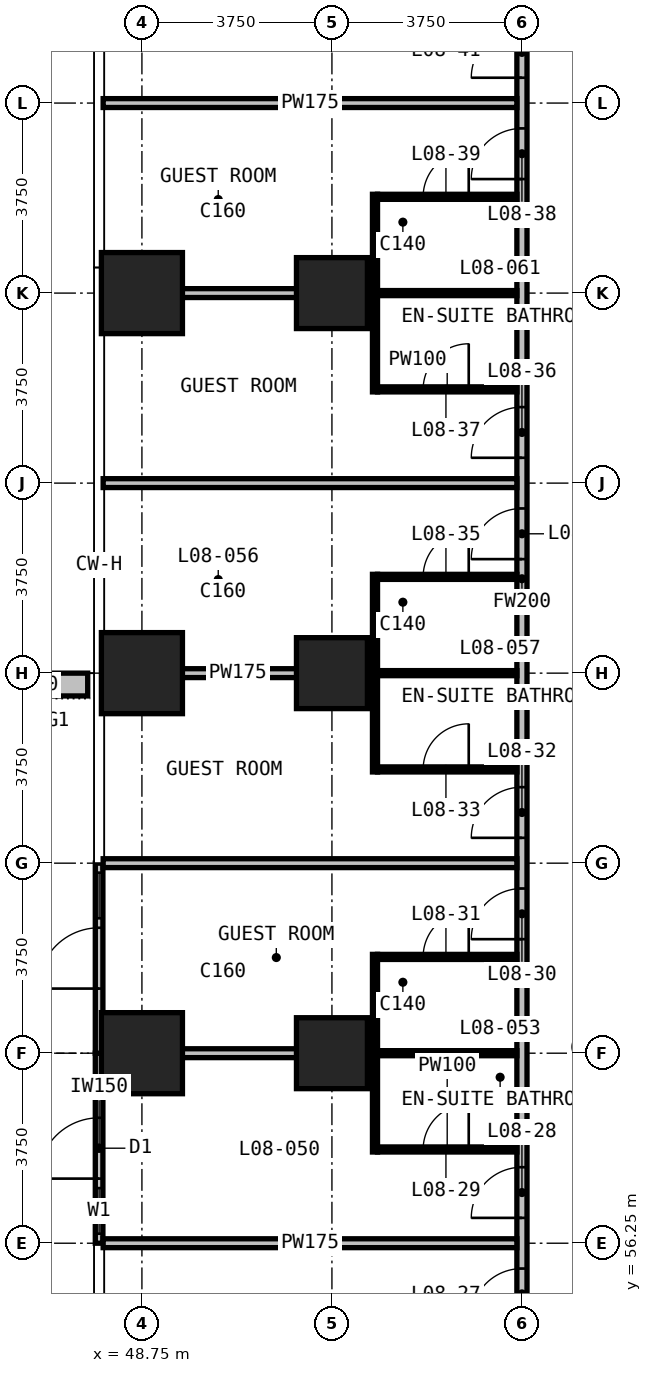
"""IFC4 building model, lengths in metres.
Left out: names, types, materials, properties, quantities, classifications, styles, units other than length and angle.
Written with IfcOpenShell. Run it as: python <this file> out.ifc"""

import sys

from ifc_helpers import new_model, si_unit, direction, frame, frame_2d, origin, origin_2d, place, context, subcontext, project, spatial, rectangle, extrude, element, fill, save


model = new_model("IFC4")
c1 = context("Model", 3, precision=1e-05, world=origin(), true_north=direction((0.0, 1.0)))
c2 = subcontext(c1, "Body", "Model", "MODEL_VIEW")
j1 = project(units=[si_unit("LENGTHUNIT", "METRE"), si_unit("PLANEANGLEUNIT", "RADIAN")], contexts=[c1])
p1 = place(None, origin())
s1 = spatial("IfcSite", under=j1, at=p1, CompositionType="ELEMENT")
p2 = place(p1, origin())
s2 = spatial("IfcBuilding", under=s1, at=p2, CompositionType="ELEMENT")
p3 = place(p2, frame((0.0, 0.0, 46.1)))
s3 = spatial("IfcBuildingStorey", under=s2, at=p3, CompositionType="ELEMENT", Elevation=46.1)
for number, where, z_axis, x_axis in (
    (1, (48.75, 60.0, 0.0), (0.0, 0.0, 1.0), (1.0, 0.0, 0.0)),
    (2, (48.75, 67.5, 0.0), (0.0, 0.0, 1.0), (1.0, 0.0, 0.0)),
    (3, (48.75, 75.0, 0.0), (0.0, 0.0, 1.0), (1.0, 0.0, 0.0)),
):
    element("IfcColumn", number, at=place(p3, frame(where, z_axis=z_axis, x_axis=x_axis)), inside=s3, PredefinedType="COLUMN", context=c2, shape_type="SweptSolid", body=[
        extrude(rectangle(XDim=1.6, YDim=1.6, at=origin_2d()), origin(), (0.0, 0.0, 1.0), 3.3),
    ])
for number, where, z_axis, x_axis in (
    (4, (52.5, 60.0, 0.0), (0.0, 0.0, 1.0), (1.0, 0.0, 0.0)),
    (5, (52.5, 67.5, 0.0), (0.0, 0.0, 1.0), (1.0, 0.0, 0.0)),
    (6, (52.5, 75.0, 0.0), (0.0, 0.0, 1.0), (1.0, 0.0, 0.0)),
):
    element("IfcColumn", number, at=place(p3, frame(where, z_axis=z_axis, x_axis=x_axis)), inside=s3, PredefinedType="COLUMN", context=c2, shape_type="SweptSolid", body=[
        extrude(rectangle(XDim=1.4, YDim=1.4, at=origin_2d()), origin(), (0.0, 0.0, 1.0), 3.3),
    ])
p4 = place(p3, frame((47.905, 56.25, 0.0), z_axis=(0.0, 0.0, 1.0), x_axis=(0.0, 1.0, 0.0)))
e7 = element("IfcWall", 7, at=p4, inside=s3, PredefinedType="SOLIDWALL", context=c2, shape_type="SweptSolid", body=[
    extrude(rectangle(XDim=3.75, YDim=0.15, at=frame_2d((1.875, 0.0))), origin(), (0.0, 0.0, 1.0), 3.0),
])
p5 = place(p4, frame((0.188, 0.0, 0.1)))
e8 = element("IfcOpeningElement", 8, at=p5, cuts=e7, PredefinedType="OPENING", context=c2, shape_type="SweptSolid", body=[
    extrude(rectangle(XDim=0.9, YDim=2.4, at=frame_2d((0.45, 1.2))), frame((0.0, 0.085, 0.0), z_axis=(0.0, -1.0, 0.0), x_axis=(1.0, 0.0, 0.0)), (0.0, 0.0, 1.0), 0.17),
])
p6 = place(p4, frame((1.275, 0.0, 0.0)))
e9 = element("IfcOpeningElement", 9, at=p6, cuts=e7, PredefinedType="OPENING", context=c2, shape_type="SweptSolid", body=[
    extrude(rectangle(XDim=1.2, YDim=2.4, at=frame_2d((0.6, 1.2))), frame((0.0, 0.085, 0.0), z_axis=(0.0, -1.0, 0.0), x_axis=(1.0, 0.0, 0.0)), (0.0, 0.0, 1.0), 0.17),
])
p7 = place(p3, frame((47.905, 60.0, 0.0), z_axis=(0.0, 0.0, 1.0), x_axis=(0.0, 1.0, 0.0)))
e10 = element("IfcWall", 10, at=p7, inside=s3, PredefinedType="SOLIDWALL", context=c2, shape_type="SweptSolid", body=[
    extrude(rectangle(XDim=3.75, YDim=0.15, at=frame_2d((1.875, 0.0))), origin(), (0.0, 0.0, 1.0), 3.0),
])
p8 = place(p7, frame((1.275, 0.0, 0.0)))
e11 = element("IfcOpeningElement", 11, at=p8, cuts=e10, PredefinedType="OPENING", context=c2, shape_type="SweptSolid", body=[
    extrude(rectangle(XDim=1.2, YDim=2.4, at=frame_2d((0.6, 1.2))), frame((0.0, 0.085, 0.0), z_axis=(0.0, -1.0, 0.0), x_axis=(1.0, 0.0, 0.0)), (0.0, 0.0, 1.0), 0.17),
])
p9 = place(p7, frame((2.663, 0.0, 0.1)))
e12 = element("IfcOpeningElement", 12, at=p9, cuts=e10, PredefinedType="OPENING", context=c2, shape_type="SweptSolid", body=[
    extrude(rectangle(XDim=0.9, YDim=2.4, at=frame_2d((0.45, 1.2))), frame((0.0, 0.085, 0.0), z_axis=(0.0, -1.0, 0.0), x_axis=(1.0, 0.0, 0.0)), (0.0, 0.0, 1.0), 0.17),
])
p10 = place(p3, frame((47.68, 67.275, 0.0), z_axis=(0.0, 0.0, 1.0), x_axis=(-1.0, 0.0, 0.0)))
e13 = element("IfcWall", 13, at=p10, inside=s3, PredefinedType="USERDEFINED", context=c2, shape_type="SweptSolid", body=[
    extrude(rectangle(XDim=2.33, YDim=0.45, at=frame_2d((1.165, 0.0))), origin(), (0.0, 0.0, 1.0), 1.1),
])
p11 = place(p3, frame((56.25, 52.4, 0.0), z_axis=(0.0, 0.0, 1.0), x_axis=(0.0, 1.0, 0.0)))
e14 = element("IfcWall", 14, at=p11, inside=s3, PredefinedType="PARTITIONING", context=c2, shape_type="SweptSolid", body=[
    extrude(rectangle(XDim=33.925, YDim=0.2, at=frame_2d((16.962, 0.0))), origin(), (0.0, 0.0, 1.0), 3.0),
])
p12 = place(p11, frame((2.35, 0.0, 0.0)))
e15 = element("IfcOpeningElement", 15, at=p12, cuts=e14, PredefinedType="OPENING", context=c2, shape_type="SweptSolid", body=[
    extrude(rectangle(XDim=1.0, YDim=2.2, at=frame_2d((0.5, 1.1))), frame((0.0, 0.11, 0.0), z_axis=(0.0, -1.0, 0.0), x_axis=(1.0, 0.0, 0.0)), (0.0, 0.0, 1.0), 0.22),
])
p13 = place(p11, frame((4.35, 0.0, 0.0)))
e16 = element("IfcOpeningElement", 16, at=p13, cuts=e14, PredefinedType="OPENING", context=c2, shape_type="SweptSolid", body=[
    extrude(rectangle(XDim=1.0, YDim=2.2, at=frame_2d((0.5, 1.1))), frame((0.0, 0.11, 0.0), z_axis=(0.0, -1.0, 0.0), x_axis=(1.0, 0.0, 0.0)), (0.0, 0.0, 1.0), 0.22),
])
p14 = place(p11, frame((9.85, 0.0, 0.0)))
e17 = element("IfcOpeningElement", 17, at=p14, cuts=e14, PredefinedType="OPENING", context=c2, shape_type="SweptSolid", body=[
    extrude(rectangle(XDim=1.0, YDim=2.2, at=frame_2d((0.5, 1.1))), frame((0.0, 0.11, 0.0), z_axis=(0.0, -1.0, 0.0), x_axis=(1.0, 0.0, 0.0)), (0.0, 0.0, 1.0), 0.22),
])
p15 = place(p11, frame((11.85, 0.0, 0.0)))
e18 = element("IfcOpeningElement", 18, at=p15, cuts=e14, PredefinedType="OPENING", context=c2, shape_type="SweptSolid", body=[
    extrude(rectangle(XDim=1.0, YDim=2.2, at=frame_2d((0.5, 1.1))), frame((0.0, 0.11, 0.0), z_axis=(0.0, -1.0, 0.0), x_axis=(1.0, 0.0, 0.0)), (0.0, 0.0, 1.0), 0.22),
])
p16 = place(p11, frame((17.35, 0.0, 0.0)))
e19 = element("IfcOpeningElement", 19, at=p16, cuts=e14, PredefinedType="OPENING", context=c2, shape_type="SweptSolid", body=[
    extrude(rectangle(XDim=1.0, YDim=2.2, at=frame_2d((0.5, 1.1))), frame((0.0, 0.11, 0.0), z_axis=(0.0, -1.0, 0.0), x_axis=(1.0, 0.0, 0.0)), (0.0, 0.0, 1.0), 0.22),
])
p17 = place(p11, frame((19.35, 0.0, 0.0)))
e20 = element("IfcOpeningElement", 20, at=p17, cuts=e14, PredefinedType="OPENING", context=c2, shape_type="SweptSolid", body=[
    extrude(rectangle(XDim=1.0, YDim=2.2, at=frame_2d((0.5, 1.1))), frame((0.0, 0.11, 0.0), z_axis=(0.0, -1.0, 0.0), x_axis=(1.0, 0.0, 0.0)), (0.0, 0.0, 1.0), 0.22),
])
p18 = place(p11, frame((24.85, 0.0, 0.0)))
e21 = element("IfcOpeningElement", 21, at=p18, cuts=e14, PredefinedType="OPENING", context=c2, shape_type="SweptSolid", body=[
    extrude(rectangle(XDim=1.0, YDim=2.2, at=frame_2d((0.5, 1.1))), frame((0.0, 0.11, 0.0), z_axis=(0.0, -1.0, 0.0), x_axis=(1.0, 0.0, 0.0)), (0.0, 0.0, 1.0), 0.22),
])
p19 = place(p11, frame((26.85, 0.0, 0.0)))
e22 = element("IfcOpeningElement", 22, at=p19, cuts=e14, PredefinedType="OPENING", context=c2, shape_type="SweptSolid", body=[
    extrude(rectangle(XDim=1.0, YDim=2.2, at=frame_2d((0.5, 1.1))), frame((0.0, 0.11, 0.0), z_axis=(0.0, -1.0, 0.0), x_axis=(1.0, 0.0, 0.0)), (0.0, 0.0, 1.0), 0.22),
])
p20 = place(p11, frame((31.55, 0.0, 0.0)))
e23 = element("IfcOpeningElement", 23, at=p20, cuts=e14, PredefinedType="OPENING", context=c2, shape_type="SweptSolid", body=[
    extrude(rectangle(XDim=0.9, YDim=2.2, at=frame_2d((0.45, 1.1))), frame((0.0, 0.11, 0.0), z_axis=(0.0, -1.0, 0.0), x_axis=(1.0, 0.0, 0.0)), (0.0, 0.0, 1.0), 0.22),
])
p21 = place(p3, frame((47.985, 56.25, 0.0), z_axis=(0.0, 0.0, 1.0), x_axis=(1.0, 0.0, 0.0)))
e24 = element("IfcWall", 24, at=p21, inside=s3, PredefinedType="PARTITIONING", context=c2, shape_type="SweptSolid", body=[
    extrude(rectangle(XDim=8.165, YDim=0.175, at=frame_2d((4.083, 0.0))), origin(), (0.0, 0.0, 1.0), 3.0),
])
p22 = place(p3, frame((47.985, 60.0, 0.0), z_axis=(0.0, 0.0, 1.0), x_axis=(1.0, 0.0, 0.0)))
e25 = element("IfcWall", 25, at=p22, inside=s3, PredefinedType="PARTITIONING", context=c2, shape_type="SweptSolid", body=[
    extrude(rectangle(XDim=5.315, YDim=0.175, at=frame_2d((2.657, 0.0))), origin(), (0.0, 0.0, 1.0), 3.0),
])
p23 = place(p3, frame((47.985, 63.75, 0.0), z_axis=(0.0, 0.0, 1.0), x_axis=(1.0, 0.0, 0.0)))
e26 = element("IfcWall", 26, at=p23, inside=s3, PredefinedType="PARTITIONING", context=c2, shape_type="SweptSolid", body=[
    extrude(rectangle(XDim=8.165, YDim=0.175, at=frame_2d((4.083, 0.0))), origin(), (0.0, 0.0, 1.0), 3.0),
])
p24 = place(p3, frame((47.985, 67.5, 0.0), z_axis=(0.0, 0.0, 1.0), x_axis=(1.0, 0.0, 0.0)))
e27 = element("IfcWall", 27, at=p24, inside=s3, PredefinedType="PARTITIONING", context=c2, shape_type="SweptSolid", body=[
    extrude(rectangle(XDim=5.315, YDim=0.175, at=frame_2d((2.657, 0.0))), origin(), (0.0, 0.0, 1.0), 3.0),
])
p25 = place(p3, frame((47.985, 71.25, 0.0), z_axis=(0.0, 0.0, 1.0), x_axis=(1.0, 0.0, 0.0)))
e28 = element("IfcWall", 28, at=p25, inside=s3, PredefinedType="PARTITIONING", context=c2, shape_type="SweptSolid", body=[
    extrude(rectangle(XDim=8.165, YDim=0.175, at=frame_2d((4.083, 0.0))), origin(), (0.0, 0.0, 1.0), 3.0),
])
p26 = place(p3, frame((47.985, 75.0, 0.0), z_axis=(0.0, 0.0, 1.0), x_axis=(1.0, 0.0, 0.0)))
e29 = element("IfcWall", 29, at=p26, inside=s3, PredefinedType="PARTITIONING", context=c2, shape_type="SweptSolid", body=[
    extrude(rectangle(XDim=5.315, YDim=0.175, at=frame_2d((2.657, 0.0))), origin(), (0.0, 0.0, 1.0), 3.0),
])
p27 = place(p3, frame((47.985, 78.75, 0.0), z_axis=(0.0, 0.0, 1.0), x_axis=(1.0, 0.0, 0.0)))
e30 = element("IfcWall", 30, at=p27, inside=s3, PredefinedType="PARTITIONING", context=c2, shape_type="SweptSolid", body=[
    extrude(rectangle(XDim=8.165, YDim=0.175, at=frame_2d((4.083, 0.0))), origin(), (0.0, 0.0, 1.0), 3.0),
])
p28 = place(p3, frame((53.4, 58.1, 0.0), z_axis=(0.0, 0.0, 1.0), x_axis=(1.0, 0.0, 0.0)))
e31 = element("IfcWall", 31, at=p28, inside=s3, PredefinedType="PARTITIONING", context=c2, shape_type="SweptSolid", body=[
    extrude(rectangle(XDim=2.75, YDim=0.1, at=frame_2d((1.375, 0.0))), origin(), (0.0, 0.0, 1.0), 3.0),
])
p29 = place(p28, frame((0.9, 0.0, 0.0)))
e32 = element("IfcOpeningElement", 32, at=p29, cuts=e31, PredefinedType="OPENING", context=c2, shape_type="SweptSolid", body=[
    extrude(rectangle(XDim=0.9, YDim=2.2, at=frame_2d((0.45, 1.1))), frame((0.0, 0.06, 0.0), z_axis=(0.0, -1.0, 0.0), x_axis=(1.0, 0.0, 0.0)), (0.0, 0.0, 1.0), 0.12),
])
p30 = place(p3, frame((53.4, 60.0, 0.0), z_axis=(0.0, 0.0, 1.0), x_axis=(1.0, 0.0, 0.0)))
e33 = element("IfcWall", 33, at=p30, inside=s3, PredefinedType="PARTITIONING", context=c2, shape_type="SweptSolid", body=[
    extrude(rectangle(XDim=2.75, YDim=0.1, at=frame_2d((1.375, 0.0))), origin(), (0.0, 0.0, 1.0), 3.0),
])
p31 = place(p3, frame((53.4, 61.9, 0.0), z_axis=(0.0, 0.0, 1.0), x_axis=(1.0, 0.0, 0.0)))
e34 = element("IfcWall", 34, at=p31, inside=s3, PredefinedType="PARTITIONING", context=c2, shape_type="SweptSolid", body=[
    extrude(rectangle(XDim=2.75, YDim=0.1, at=frame_2d((1.375, 0.0))), origin(), (0.0, 0.0, 1.0), 3.0),
])
p32 = place(p31, frame((0.9, 0.0, 0.0)))
e35 = element("IfcOpeningElement", 35, at=p32, cuts=e34, PredefinedType="OPENING", context=c2, shape_type="SweptSolid", body=[
    extrude(rectangle(XDim=0.9, YDim=2.2, at=frame_2d((0.45, 1.1))), frame((0.0, 0.06, 0.0), z_axis=(0.0, -1.0, 0.0), x_axis=(1.0, 0.0, 0.0)), (0.0, 0.0, 1.0), 0.12),
])
p33 = place(p3, frame((53.4, 65.6, 0.0), z_axis=(0.0, 0.0, 1.0), x_axis=(1.0, 0.0, 0.0)))
e36 = element("IfcWall", 36, at=p33, inside=s3, PredefinedType="PARTITIONING", context=c2, shape_type="SweptSolid", body=[
    extrude(rectangle(XDim=2.75, YDim=0.1, at=frame_2d((1.375, 0.0))), origin(), (0.0, 0.0, 1.0), 3.0),
])
p34 = place(p33, frame((0.9, 0.0, 0.0)))
e37 = element("IfcOpeningElement", 37, at=p34, cuts=e36, PredefinedType="OPENING", context=c2, shape_type="SweptSolid", body=[
    extrude(rectangle(XDim=0.9, YDim=2.2, at=frame_2d((0.45, 1.1))), frame((0.0, 0.06, 0.0), z_axis=(0.0, -1.0, 0.0), x_axis=(1.0, 0.0, 0.0)), (0.0, 0.0, 1.0), 0.12),
])
p35 = place(p3, frame((53.4, 67.5, 0.0), z_axis=(0.0, 0.0, 1.0), x_axis=(1.0, 0.0, 0.0)))
e38 = element("IfcWall", 38, at=p35, inside=s3, PredefinedType="PARTITIONING", context=c2, shape_type="SweptSolid", body=[
    extrude(rectangle(XDim=2.75, YDim=0.1, at=frame_2d((1.375, 0.0))), origin(), (0.0, 0.0, 1.0), 3.0),
])
p36 = place(p3, frame((53.4, 69.4, 0.0), z_axis=(0.0, 0.0, 1.0), x_axis=(1.0, 0.0, 0.0)))
e39 = element("IfcWall", 39, at=p36, inside=s3, PredefinedType="PARTITIONING", context=c2, shape_type="SweptSolid", body=[
    extrude(rectangle(XDim=2.75, YDim=0.1, at=frame_2d((1.375, 0.0))), origin(), (0.0, 0.0, 1.0), 3.0),
])
p37 = place(p36, frame((0.9, 0.0, 0.0)))
e40 = element("IfcOpeningElement", 40, at=p37, cuts=e39, PredefinedType="OPENING", context=c2, shape_type="SweptSolid", body=[
    extrude(rectangle(XDim=0.9, YDim=2.2, at=frame_2d((0.45, 1.1))), frame((0.0, 0.06, 0.0), z_axis=(0.0, -1.0, 0.0), x_axis=(1.0, 0.0, 0.0)), (0.0, 0.0, 1.0), 0.12),
])
p38 = place(p3, frame((53.4, 73.1, 0.0), z_axis=(0.0, 0.0, 1.0), x_axis=(1.0, 0.0, 0.0)))
e41 = element("IfcWall", 41, at=p38, inside=s3, PredefinedType="PARTITIONING", context=c2, shape_type="SweptSolid", body=[
    extrude(rectangle(XDim=2.75, YDim=0.1, at=frame_2d((1.375, 0.0))), origin(), (0.0, 0.0, 1.0), 3.0),
])
p39 = place(p38, frame((0.9, 0.0, 0.0)))
e42 = element("IfcOpeningElement", 42, at=p39, cuts=e41, PredefinedType="OPENING", context=c2, shape_type="SweptSolid", body=[
    extrude(rectangle(XDim=0.9, YDim=2.2, at=frame_2d((0.45, 1.1))), frame((0.0, 0.06, 0.0), z_axis=(0.0, -1.0, 0.0), x_axis=(1.0, 0.0, 0.0)), (0.0, 0.0, 1.0), 0.12),
])
p40 = place(p3, frame((53.4, 75.0, 0.0), z_axis=(0.0, 0.0, 1.0), x_axis=(1.0, 0.0, 0.0)))
e43 = element("IfcWall", 43, at=p40, inside=s3, PredefinedType="PARTITIONING", context=c2, shape_type="SweptSolid", body=[
    extrude(rectangle(XDim=2.75, YDim=0.1, at=frame_2d((1.375, 0.0))), origin(), (0.0, 0.0, 1.0), 3.0),
])
p41 = place(p3, frame((53.4, 76.9, 0.0), z_axis=(0.0, 0.0, 1.0), x_axis=(1.0, 0.0, 0.0)))
e44 = element("IfcWall", 44, at=p41, inside=s3, PredefinedType="PARTITIONING", context=c2, shape_type="SweptSolid", body=[
    extrude(rectangle(XDim=2.75, YDim=0.1, at=frame_2d((1.375, 0.0))), origin(), (0.0, 0.0, 1.0), 3.0),
])
p42 = place(p41, frame((0.9, 0.0, 0.0)))
e45 = element("IfcOpeningElement", 45, at=p42, cuts=e44, PredefinedType="OPENING", context=c2, shape_type="SweptSolid", body=[
    extrude(rectangle(XDim=0.9, YDim=2.2, at=frame_2d((0.45, 1.1))), frame((0.0, 0.06, 0.0), z_axis=(0.0, -1.0, 0.0), x_axis=(1.0, 0.0, 0.0)), (0.0, 0.0, 1.0), 0.12),
])
for number, where, z_axis, x_axis in (
    (46, (53.35, 58.05, 0.0), (0.0, 0.0, 1.0), (0.0, 1.0, 0.0)),
    (47, (53.35, 65.55, 0.0), (0.0, 0.0, 1.0), (0.0, 1.0, 0.0)),
    (48, (53.35, 73.05, 0.0), (0.0, 0.0, 1.0), (0.0, 1.0, 0.0)),
):
    element("IfcWall", number, at=place(p3, frame(where, z_axis=z_axis, x_axis=x_axis)), inside=s3, PredefinedType="PARTITIONING", context=c2, shape_type="SweptSolid", body=[
        extrude(rectangle(XDim=3.9, YDim=0.1, at=frame_2d((1.95, 0.0))), origin(), (0.0, 0.0, 1.0), 3.0),
    ])
p43 = place(p5, origin())
e49 = element("IfcWindow", 49, at=p43, inside=s3, PartitioningType="SINGLE_PANEL", PredefinedType="WINDOW", context=c2, shape_type="SweptSolid", body=[
    extrude(rectangle(XDim=0.9, YDim=2.4, at=frame_2d((0.45, 1.2))), frame((0.0, 0.03, 0.0), z_axis=(0.0, -1.0, 0.0), x_axis=(1.0, 0.0, 0.0)), (0.0, 0.0, 1.0), 0.06),
])
fill(e8, e49)
p44 = place(p6, origin())
e50 = element("IfcDoor", 50, at=p44, inside=s3, OperationType="SINGLE_SWING_LEFT", PredefinedType="DOOR", context=c2, shape_type="SweptSolid", body=[
    extrude(rectangle(XDim=1.2, YDim=2.4, at=frame_2d((0.6, 1.2))), frame((0.0, 0.025, 0.0), z_axis=(0.0, -1.0, 0.0), x_axis=(1.0, 0.0, 0.0)), (0.0, 0.0, 1.0), 0.05),
])
fill(e9, e50)
p45 = place(p8, origin())
e51 = element("IfcDoor", 51, at=p45, inside=s3, OperationType="SINGLE_SWING_LEFT", PredefinedType="DOOR", context=c2, shape_type="SweptSolid", body=[
    extrude(rectangle(XDim=1.2, YDim=2.4, at=frame_2d((0.6, 1.2))), frame((0.0, 0.025, 0.0), z_axis=(0.0, -1.0, 0.0), x_axis=(1.0, 0.0, 0.0)), (0.0, 0.0, 1.0), 0.05),
])
fill(e11, e51)
p46 = place(p9, origin())
e52 = element("IfcWindow", 52, at=p46, inside=s3, PartitioningType="SINGLE_PANEL", PredefinedType="WINDOW", context=c2, shape_type="SweptSolid", body=[
    extrude(rectangle(XDim=0.9, YDim=2.4, at=frame_2d((0.45, 1.2))), frame((0.0, 0.03, 0.0), z_axis=(0.0, -1.0, 0.0), x_axis=(1.0, 0.0, 0.0)), (0.0, 0.0, 1.0), 0.06),
])
fill(e12, e52)
p47 = place(p12, origin())
e53 = element("IfcDoor", 53, at=p47, inside=s3, OperationType="SINGLE_SWING_LEFT", PredefinedType="DOOR", context=c2, shape_type="SweptSolid", body=[
    extrude(rectangle(XDim=1.0, YDim=2.2, at=frame_2d((0.5, 1.1))), frame((0.0, 0.025, 0.0), z_axis=(0.0, -1.0, 0.0), x_axis=(1.0, 0.0, 0.0)), (0.0, 0.0, 1.0), 0.05),
])
fill(e15, e53)
p48 = place(p13, origin())
e54 = element("IfcDoor", 54, at=p48, inside=s3, OperationType="SINGLE_SWING_LEFT", PredefinedType="DOOR", context=c2, shape_type="SweptSolid", body=[
    extrude(rectangle(XDim=1.0, YDim=2.2, at=frame_2d((0.5, 1.1))), frame((0.0, 0.025, 0.0), z_axis=(0.0, -1.0, 0.0), x_axis=(1.0, 0.0, 0.0)), (0.0, 0.0, 1.0), 0.05),
])
fill(e16, e54)
p49 = place(p29, origin())
e55 = element("IfcDoor", 55, at=p49, inside=s3, OperationType="SINGLE_SWING_RIGHT", PredefinedType="DOOR", context=c2, shape_type="SweptSolid", body=[
    extrude(rectangle(XDim=0.9, YDim=2.2, at=frame_2d((0.45, 1.1))), frame((0.0, 0.025, 0.0), z_axis=(0.0, -1.0, 0.0), x_axis=(1.0, 0.0, 0.0)), (0.0, 0.0, 1.0), 0.05),
])
fill(e32, e55)
p50 = place(p14, origin())
e56 = element("IfcDoor", 56, at=p50, inside=s3, OperationType="SINGLE_SWING_LEFT", PredefinedType="DOOR", context=c2, shape_type="SweptSolid", body=[
    extrude(rectangle(XDim=1.0, YDim=2.2, at=frame_2d((0.5, 1.1))), frame((0.0, 0.025, 0.0), z_axis=(0.0, -1.0, 0.0), x_axis=(1.0, 0.0, 0.0)), (0.0, 0.0, 1.0), 0.05),
])
fill(e17, e56)
p51 = place(p32, origin())
e57 = element("IfcDoor", 57, at=p51, inside=s3, OperationType="SINGLE_SWING_RIGHT", PredefinedType="DOOR", context=c2, shape_type="SweptSolid", body=[
    extrude(rectangle(XDim=0.9, YDim=2.2, at=frame_2d((0.45, 1.1))), frame((0.0, 0.025, 0.0), z_axis=(0.0, -1.0, 0.0), x_axis=(1.0, 0.0, 0.0)), (0.0, 0.0, 1.0), 0.05),
])
fill(e35, e57)
p52 = place(p15, origin())
e58 = element("IfcDoor", 58, at=p52, inside=s3, OperationType="SINGLE_SWING_LEFT", PredefinedType="DOOR", context=c2, shape_type="SweptSolid", body=[
    extrude(rectangle(XDim=1.0, YDim=2.2, at=frame_2d((0.5, 1.1))), frame((0.0, 0.025, 0.0), z_axis=(0.0, -1.0, 0.0), x_axis=(1.0, 0.0, 0.0)), (0.0, 0.0, 1.0), 0.05),
])
fill(e18, e58)
p53 = place(p34, origin())
e59 = element("IfcDoor", 59, at=p53, inside=s3, OperationType="SINGLE_SWING_RIGHT", PredefinedType="DOOR", context=c2, shape_type="SweptSolid", body=[
    extrude(rectangle(XDim=0.9, YDim=2.2, at=frame_2d((0.45, 1.1))), frame((0.0, 0.025, 0.0), z_axis=(0.0, -1.0, 0.0), x_axis=(1.0, 0.0, 0.0)), (0.0, 0.0, 1.0), 0.05),
])
fill(e37, e59)
p54 = place(p16, origin())
e60 = element("IfcDoor", 60, at=p54, inside=s3, OperationType="SINGLE_SWING_RIGHT", PredefinedType="DOOR", context=c2, shape_type="SweptSolid", body=[
    extrude(rectangle(XDim=1.0, YDim=2.2, at=frame_2d((0.5, 1.1))), frame((0.0, 0.025, 0.0), z_axis=(0.0, -1.0, 0.0), x_axis=(1.0, 0.0, 0.0)), (0.0, 0.0, 1.0), 0.05),
])
fill(e19, e60)
p55 = place(p37, origin())
e61 = element("IfcDoor", 61, at=p55, inside=s3, OperationType="SINGLE_SWING_RIGHT", PredefinedType="DOOR", context=c2, shape_type="SweptSolid", body=[
    extrude(rectangle(XDim=0.9, YDim=2.2, at=frame_2d((0.45, 1.1))), frame((0.0, 0.025, 0.0), z_axis=(0.0, -1.0, 0.0), x_axis=(1.0, 0.0, 0.0)), (0.0, 0.0, 1.0), 0.05),
])
fill(e40, e61)
p56 = place(p17, origin())
e62 = element("IfcDoor", 62, at=p56, inside=s3, OperationType="SINGLE_SWING_RIGHT", PredefinedType="DOOR", context=c2, shape_type="SweptSolid", body=[
    extrude(rectangle(XDim=1.0, YDim=2.2, at=frame_2d((0.5, 1.1))), frame((0.0, 0.025, 0.0), z_axis=(0.0, -1.0, 0.0), x_axis=(1.0, 0.0, 0.0)), (0.0, 0.0, 1.0), 0.05),
])
fill(e20, e62)
p57 = place(p39, origin())
e63 = element("IfcDoor", 63, at=p57, inside=s3, OperationType="SINGLE_SWING_RIGHT", PredefinedType="DOOR", context=c2, shape_type="SweptSolid", body=[
    extrude(rectangle(XDim=0.9, YDim=2.2, at=frame_2d((0.45, 1.1))), frame((0.0, 0.025, 0.0), z_axis=(0.0, -1.0, 0.0), x_axis=(1.0, 0.0, 0.0)), (0.0, 0.0, 1.0), 0.05),
])
fill(e42, e63)
p58 = place(p18, origin())
e64 = element("IfcDoor", 64, at=p58, inside=s3, OperationType="SINGLE_SWING_LEFT", PredefinedType="DOOR", context=c2, shape_type="SweptSolid", body=[
    extrude(rectangle(XDim=1.0, YDim=2.2, at=frame_2d((0.5, 1.1))), frame((0.0, 0.025, 0.0), z_axis=(0.0, -1.0, 0.0), x_axis=(1.0, 0.0, 0.0)), (0.0, 0.0, 1.0), 0.05),
])
fill(e21, e64)
p59 = place(p42, origin())
e65 = element("IfcDoor", 65, at=p59, inside=s3, OperationType="SINGLE_SWING_RIGHT", PredefinedType="DOOR", context=c2, shape_type="SweptSolid", body=[
    extrude(rectangle(XDim=0.9, YDim=2.2, at=frame_2d((0.45, 1.1))), frame((0.0, 0.025, 0.0), z_axis=(0.0, -1.0, 0.0), x_axis=(1.0, 0.0, 0.0)), (0.0, 0.0, 1.0), 0.05),
])
fill(e45, e65)
p60 = place(p19, origin())
e66 = element("IfcDoor", 66, at=p60, inside=s3, OperationType="SINGLE_SWING_LEFT", PredefinedType="DOOR", context=c2, shape_type="SweptSolid", body=[
    extrude(rectangle(XDim=1.0, YDim=2.2, at=frame_2d((0.5, 1.1))), frame((0.0, 0.025, 0.0), z_axis=(0.0, -1.0, 0.0), x_axis=(1.0, 0.0, 0.0)), (0.0, 0.0, 1.0), 0.05),
])
fill(e22, e66)
save(model, sys.argv[1])
